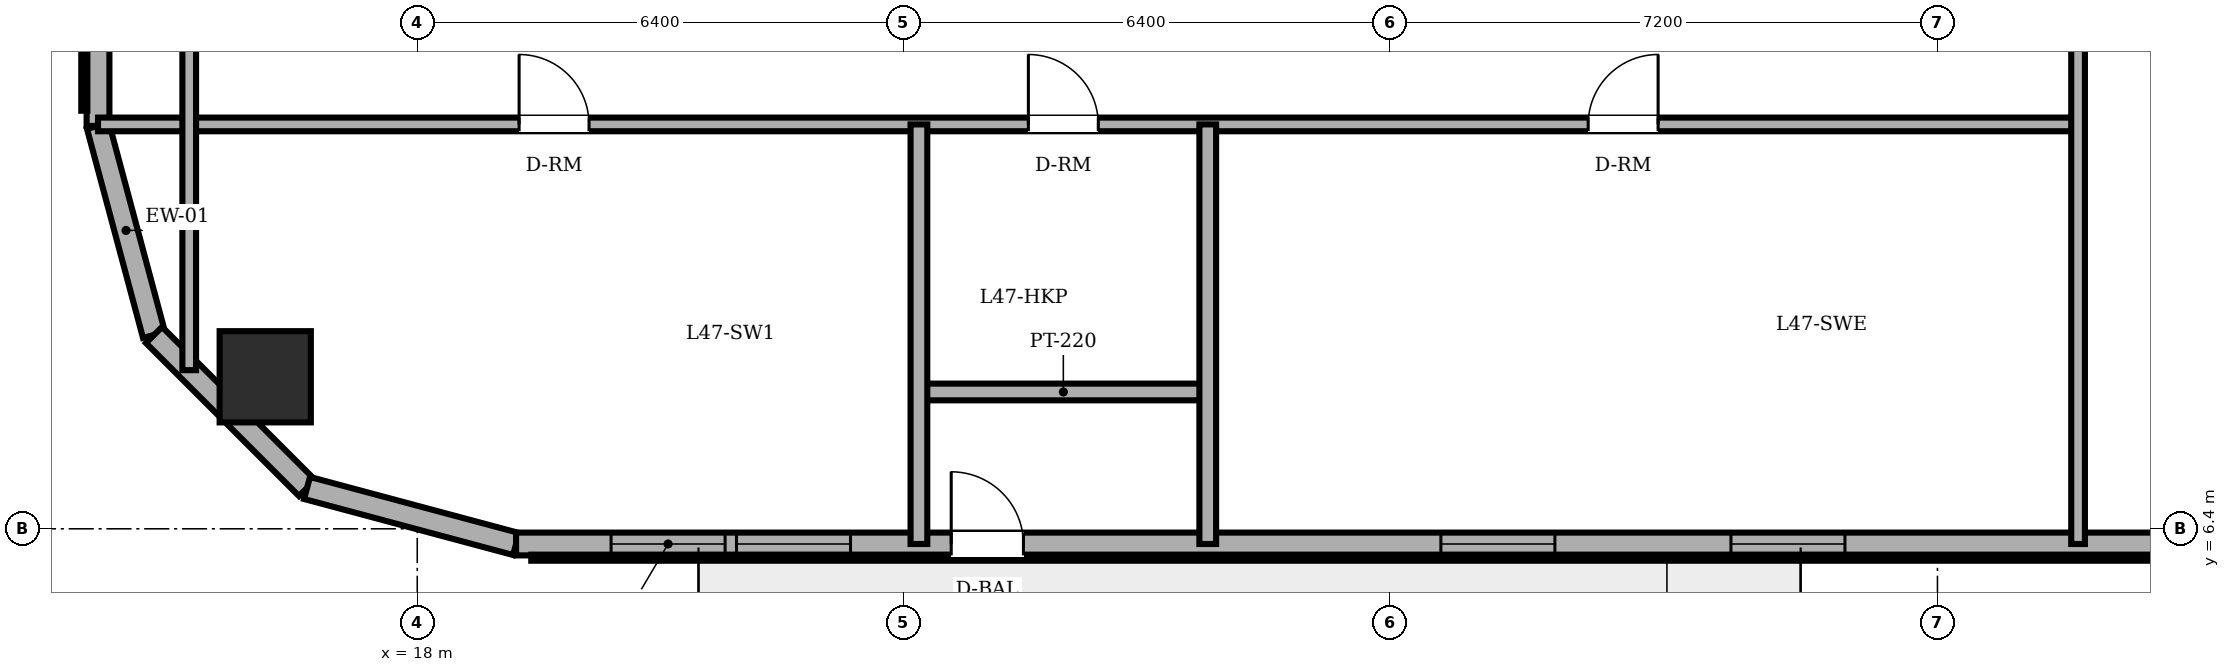
"""IFC4 building model, lengths in metres.
Left out: names, types, materials, properties, quantities, classifications, styles, units other than length and angle.
Written with IfcOpenShell. Run it as: python <this file> out.ifc"""

import sys

from ifc_helpers import new_model, si_unit, direction, frame, frame_2d, origin, origin_2d, place, context, subcontext, project, spatial, rectangle, circle, extrude, element, fill, save


model = new_model("IFC4")
c1 = context("Model", 3, precision=1e-05, world=origin(), true_north=direction((0.0, 1.0)))
c2 = subcontext(c1, "Body", "Model", "MODEL_VIEW")
j1 = project(units=[si_unit("LENGTHUNIT", "METRE"), si_unit("PLANEANGLEUNIT", "RADIAN")], contexts=[c1])
p1 = place(None, origin())
s1 = spatial("IfcSite", under=j1, at=p1, CompositionType="ELEMENT")
p2 = place(p1, origin())
s2 = spatial("IfcBuilding", under=s1, at=p2, CompositionType="ELEMENT")
p3 = place(p2, frame((0.0, 0.0, 179.8)))
s3 = spatial("IfcBuildingStorey", under=s2, at=p3, CompositionType="ELEMENT", Elevation=179.8)
p4 = place(p3, frame((16.0, 8.4, 0.0), z_axis=(0.0, 0.0, 1.0), x_axis=(1.0, 0.0, 0.0)))
e1 = element("IfcColumn", 1, at=p4, inside=s3, PredefinedType="COLUMN", context=c2, shape_type="SweptSolid", body=[
    extrude(circle(Radius=0.6, at=origin_2d()), origin(), (0.0, 0.0, 1.0), 3.6),
])
p5 = place(p3, frame((13.8, 11.7, 0.0), z_axis=(0.0, 0.0, 1.0), x_axis=(0.258884674387, -0.965908238586, 0.0)))
e2 = element("IfcWall", 2, at=p5, inside=s3, PredefinedType="SOLIDWALL", context=c2, shape_type="SweptSolid", body=[
    extrude(rectangle(XDim=2.847, YDim=0.3, at=frame_2d((1.424, 0.0))), origin(), (0.0, 0.0, 1.0), 3.4),
])
p6 = place(p3, frame((14.537, 8.95, 0.0), z_axis=(0.0, 0.0, 1.0), x_axis=(0.707106781187, -0.707106781187, 0.0)))
e3 = element("IfcWall", 3, at=p6, inside=s3, PredefinedType="SOLIDWALL", context=c2, shape_type="SweptSolid", body=[
    extrude(rectangle(XDim=2.847, YDim=0.3, at=frame_2d((1.423, 0.0))), origin(), (0.0, 0.0, 1.0), 3.4),
])
p7 = place(p3, frame((16.55, 6.937, 0.0), z_axis=(0.0, 0.0, 1.0), x_axis=(0.965908238586, -0.258884674387, 0.0)))
e4 = element("IfcWall", 4, at=p7, inside=s3, PredefinedType="SOLIDWALL", context=c2, shape_type="SweptSolid", body=[
    extrude(rectangle(XDim=2.847, YDim=0.3, at=frame_2d((1.424, 0.0))), origin(), (0.0, 0.0, 1.0), 3.4),
])
p8 = place(p3, frame((19.3, 6.2, 0.0), z_axis=(0.0, 0.0, 1.0), x_axis=(1.0, 0.0, 0.0)))
e5 = element("IfcWall", 5, at=p8, inside=s3, PredefinedType="SOLIDWALL", context=c2, shape_type="SweptSolid", body=[
    extrude(rectangle(XDim=30.282, YDim=0.3, at=frame_2d((15.141, 0.0))), origin(), (0.0, 0.0, 1.0), 3.4),
])
p9 = place(p8, frame((5.725, 0.0, 0.0)))
e6 = element("IfcOpeningElement", 6, at=p9, cuts=e5, PredefinedType="OPENING", context=c2, shape_type="SweptSolid", body=[
    extrude(rectangle(XDim=0.95, YDim=2.2, at=frame_2d((0.475, 1.1))), frame((0.0, 0.16, 0.0), z_axis=(0.0, -1.0, 0.0), x_axis=(1.0, 0.0, 0.0)), (0.0, 0.0, 1.0), 0.32),
])
p10 = place(p8, frame((1.25, 0.0, 0.85)))
e7 = element("IfcOpeningElement", 7, at=p10, cuts=e5, PredefinedType="OPENING", context=c2, shape_type="SweptSolid", body=[
    extrude(rectangle(XDim=1.5, YDim=1.55, at=frame_2d((0.75, 0.775))), frame((0.0, 0.16, 0.0), z_axis=(0.0, -1.0, 0.0), x_axis=(1.0, 0.0, 0.0)), (0.0, 0.0, 1.0), 0.32),
])
p11 = place(p8, frame((2.9, 0.0, 0.85)))
e8 = element("IfcOpeningElement", 8, at=p11, cuts=e5, PredefinedType="OPENING", context=c2, shape_type="SweptSolid", body=[
    extrude(rectangle(XDim=1.5, YDim=1.55, at=frame_2d((0.75, 0.775))), frame((0.0, 0.16, 0.0), z_axis=(0.0, -1.0, 0.0), x_axis=(1.0, 0.0, 0.0)), (0.0, 0.0, 1.0), 0.32),
])
p12 = place(p8, frame((12.167, 0.0, 0.85)))
e9 = element("IfcOpeningElement", 9, at=p12, cuts=e5, PredefinedType="OPENING", context=c2, shape_type="SweptSolid", body=[
    extrude(rectangle(XDim=1.5, YDim=1.55, at=frame_2d((0.75, 0.775))), frame((0.0, 0.16, 0.0), z_axis=(0.0, -1.0, 0.0), x_axis=(1.0, 0.0, 0.0)), (0.0, 0.0, 1.0), 0.32),
])
p13 = place(p8, frame((15.983, 0.0, 0.85)))
e10 = element("IfcOpeningElement", 10, at=p13, cuts=e5, PredefinedType="OPENING", context=c2, shape_type="SweptSolid", body=[
    extrude(rectangle(XDim=1.5, YDim=1.55, at=frame_2d((0.75, 0.775))), frame((0.0, 0.16, 0.0), z_axis=(0.0, -1.0, 0.0), x_axis=(1.0, 0.0, 0.0)), (0.0, 0.0, 1.0), 0.32),
])
p14 = place(p8, frame((21.6, 0.0, 0.85)))
e11 = element("IfcOpeningElement", 11, at=p14, cuts=e5, PredefinedType="OPENING", context=c2, shape_type="SweptSolid", body=[
    extrude(rectangle(XDim=1.5, YDim=1.55, at=frame_2d((0.75, 0.775))), frame((0.0, 0.16, 0.0), z_axis=(0.0, -1.0, 0.0), x_axis=(1.0, 0.0, 0.0)), (0.0, 0.0, 1.0), 0.32),
])
p15 = place(p8, frame((25.327, 0.0, 0.85)))
e12 = element("IfcOpeningElement", 12, at=p15, cuts=e5, PredefinedType="OPENING", context=c2, shape_type="SweptSolid", body=[
    extrude(rectangle(XDim=1.5, YDim=1.55, at=frame_2d((0.75, 0.775))), frame((0.0, 0.16, 0.0), z_axis=(0.0, -1.0, 0.0), x_axis=(1.0, 0.0, 0.0)), (0.0, 0.0, 1.0), 0.32),
])
p16 = place(p8, frame((27.255, 0.0, 0.85)))
e13 = element("IfcOpeningElement", 13, at=p16, cuts=e5, PredefinedType="OPENING", context=c2, shape_type="SweptSolid", body=[
    extrude(rectangle(XDim=1.5, YDim=1.55, at=frame_2d((0.75, 0.775))), frame((0.0, 0.16, 0.0), z_axis=(0.0, -1.0, 0.0), x_axis=(1.0, 0.0, 0.0)), (0.0, 0.0, 1.0), 0.32),
])
p17 = place(p3, frame((13.8, 36.3, 0.0), z_axis=(0.0, 0.0, 1.0), x_axis=(0.0, -1.0, 0.0)))
e14 = element("IfcWall", 14, at=p17, inside=s3, PredefinedType="SOLIDWALL", context=c2, shape_type="SweptSolid", body=[
    extrude(rectangle(XDim=24.6, YDim=0.3, at=frame_2d((12.3, 0.0))), origin(), (0.0, 0.0, 1.0), 3.4),
])
p18 = place(p17, frame((5.003, 0.0, 0.85)))
e15 = element("IfcOpeningElement", 15, at=p18, cuts=e14, PredefinedType="OPENING", context=c2, shape_type="SweptSolid", body=[
    extrude(rectangle(XDim=1.5, YDim=1.55, at=frame_2d((0.75, 0.775))), frame((0.0, 0.16, 0.0), z_axis=(0.0, -1.0, 0.0), x_axis=(1.0, 0.0, 0.0)), (0.0, 0.0, 1.0), 0.32),
])
p19 = place(p17, frame((8.277, 0.0, 0.85)))
e16 = element("IfcOpeningElement", 16, at=p19, cuts=e14, PredefinedType="OPENING", context=c2, shape_type="SweptSolid", body=[
    extrude(rectangle(XDim=1.5, YDim=1.55, at=frame_2d((0.75, 0.775))), frame((0.0, 0.16, 0.0), z_axis=(0.0, -1.0, 0.0), x_axis=(1.0, 0.0, 0.0)), (0.0, 0.0, 1.0), 0.32),
])
p20 = place(p17, frame((14.823, 0.0, 0.85)))
e17 = element("IfcOpeningElement", 17, at=p20, cuts=e14, PredefinedType="OPENING", context=c2, shape_type="SweptSolid", body=[
    extrude(rectangle(XDim=1.5, YDim=1.55, at=frame_2d((0.75, 0.775))), frame((0.0, 0.16, 0.0), z_axis=(0.0, -1.0, 0.0), x_axis=(1.0, 0.0, 0.0)), (0.0, 0.0, 1.0), 0.32),
])
p21 = place(p17, frame((18.097, 0.0, 0.85)))
e18 = element("IfcOpeningElement", 18, at=p21, cuts=e14, PredefinedType="OPENING", context=c2, shape_type="SweptSolid", body=[
    extrude(rectangle(XDim=1.5, YDim=1.55, at=frame_2d((0.75, 0.775))), frame((0.0, 0.16, 0.0), z_axis=(0.0, -1.0, 0.0), x_axis=(1.0, 0.0, 0.0)), (0.0, 0.0, 1.0), 0.32),
])
p22 = place(p3, frame((24.6, 8.2, 0.0), z_axis=(0.0, 0.0, 1.0), x_axis=(1.0, 0.0, 0.0)))
e19 = element("IfcWall", 19, at=p22, inside=s3, PredefinedType="PARTITIONING", context=c2, shape_type="SweptSolid", body=[
    extrude(rectangle(XDim=3.8, YDim=0.22, at=frame_2d((1.9, 0.0))), origin(), (0.0, 0.0, 1.0), 2.882),
])
p23 = place(p3, frame((13.8, 11.72, 0.0), z_axis=(0.0, 0.0, 1.0), x_axis=(1.0, 0.0, 0.0)))
e20 = element("IfcWall", 20, at=p23, inside=s3, PredefinedType="PARTITIONING", context=c2, shape_type="SweptSolid", body=[
    extrude(rectangle(XDim=26.05, YDim=0.18, at=frame_2d((13.025, 0.0))), origin(), (0.0, 0.0, 1.0), 3.4),
])
p24 = place(p23, frame((12.24, 0.0, 0.0)))
e21 = element("IfcOpeningElement", 21, at=p24, cuts=e20, PredefinedType="OPENING", context=c2, shape_type="SweptSolid", body=[
    extrude(rectangle(XDim=0.92, YDim=2.1, at=frame_2d((0.46, 1.05))), frame((0.0, 0.1, 0.0), z_axis=(0.0, -1.0, 0.0), x_axis=(1.0, 0.0, 0.0)), (0.0, 0.0, 1.0), 0.2),
])
p25 = place(p23, frame((5.54, 0.0, 0.0)))
e22 = element("IfcOpeningElement", 22, at=p25, cuts=e20, PredefinedType="OPENING", context=c2, shape_type="SweptSolid", body=[
    extrude(rectangle(XDim=0.92, YDim=2.1, at=frame_2d((0.46, 1.05))), frame((0.0, 0.1, 0.0), z_axis=(0.0, -1.0, 0.0), x_axis=(1.0, 0.0, 0.0)), (0.0, 0.0, 1.0), 0.2),
])
p26 = place(p23, frame((19.605, 0.0, 0.0)))
e23 = element("IfcOpeningElement", 23, at=p26, cuts=e20, PredefinedType="OPENING", context=c2, shape_type="SweptSolid", body=[
    extrude(rectangle(XDim=0.92, YDim=2.1, at=frame_2d((0.46, 1.05))), frame((0.0, 0.1, 0.0), z_axis=(0.0, -1.0, 0.0), x_axis=(1.0, 0.0, 0.0)), (0.0, 0.0, 1.0), 0.2),
])
p27 = place(p3, frame((15.0, 8.487, 0.0), z_axis=(0.0, 0.0, 1.0), x_axis=(0.0, 1.0, 0.0)))
e24 = element("IfcWall", 24, at=p27, inside=s3, PredefinedType="PARTITIONING", context=c2, shape_type="SweptSolid", body=[
    extrude(rectangle(XDim=5.693, YDim=0.18, at=frame_2d((2.846, 0.0))), origin(), (0.0, 0.0, 1.0), 3.4),
])
for number, where, z_axis, x_axis in (
    (25, (24.6, 6.2, 0.0), (0.0, 0.0, 1.0), (0.0, 1.0, 0.0)),
    (26, (28.4, 6.2, 0.0), (0.0, 0.0, 1.0), (0.0, 1.0, 0.0)),
):
    element("IfcWall", number, at=place(p3, frame(where, z_axis=z_axis, x_axis=x_axis)), inside=s3, PredefinedType="PARTITIONING", context=c2, shape_type="SweptSolid", body=[
        extrude(rectangle(XDim=5.52, YDim=0.22, at=frame_2d((2.76, 0.0))), origin(), (0.0, 0.0, 1.0), 3.4),
    ])
p28 = place(p3, frame((39.85, 6.2, 0.0), z_axis=(0.0, 0.0, 1.0), x_axis=(0.0, 1.0, 0.0)))
e27 = element("IfcWall", 27, at=p28, inside=s3, PredefinedType="PARTITIONING", context=c2, shape_type="SweptSolid", body=[
    extrude(rectangle(XDim=16.62, YDim=0.18, at=frame_2d((8.31, 0.0))), origin(), (0.0, 0.0, 1.0), 3.4),
])
p29 = place(p28, frame((10.35, 0.0, 0.0)))
e28 = element("IfcOpeningElement", 28, at=p29, cuts=e27, PredefinedType="OPENING", context=c2, shape_type="SweptSolid", body=[
    extrude(rectangle(XDim=0.92, YDim=2.1, at=frame_2d((0.46, 1.05))), frame((0.0, 0.1, 0.0), z_axis=(0.0, -1.0, 0.0), x_axis=(1.0, 0.0, 0.0)), (0.0, 0.0, 1.0), 0.2),
])
p30 = place(p9, origin())
e29 = element("IfcDoor", 29, at=p30, inside=s3, OperationType="SINGLE_SWING_LEFT", PredefinedType="DOOR", context=c2, shape_type="SweptSolid", body=[
    extrude(rectangle(XDim=0.95, YDim=2.2, at=frame_2d((0.475, 1.1))), frame((0.0, 0.025, 0.0), z_axis=(0.0, -1.0, 0.0), x_axis=(1.0, 0.0, 0.0)), (0.0, 0.0, 1.0), 0.05),
])
fill(e6, e29)
p31 = place(p10, origin())
e30 = element("IfcWindow", 30, at=p31, inside=s3, PartitioningType="DOUBLE_PANEL_VERTICAL", PredefinedType="WINDOW", context=c2, shape_type="SweptSolid", body=[
    extrude(rectangle(XDim=1.5, YDim=1.55, at=frame_2d((0.75, 0.775))), frame((0.0, 0.03, 0.0), z_axis=(0.0, -1.0, 0.0), x_axis=(1.0, 0.0, 0.0)), (0.0, 0.0, 1.0), 0.06),
])
fill(e7, e30)
p32 = place(p11, origin())
e31 = element("IfcWindow", 31, at=p32, inside=s3, PartitioningType="DOUBLE_PANEL_VERTICAL", PredefinedType="WINDOW", context=c2, shape_type="SweptSolid", body=[
    extrude(rectangle(XDim=1.5, YDim=1.55, at=frame_2d((0.75, 0.775))), frame((0.0, 0.03, 0.0), z_axis=(0.0, -1.0, 0.0), x_axis=(1.0, 0.0, 0.0)), (0.0, 0.0, 1.0), 0.06),
])
fill(e8, e31)
p33 = place(p12, origin())
e32 = element("IfcWindow", 32, at=p33, inside=s3, PartitioningType="DOUBLE_PANEL_VERTICAL", PredefinedType="WINDOW", context=c2, shape_type="SweptSolid", body=[
    extrude(rectangle(XDim=1.5, YDim=1.55, at=frame_2d((0.75, 0.775))), frame((0.0, 0.03, 0.0), z_axis=(0.0, -1.0, 0.0), x_axis=(1.0, 0.0, 0.0)), (0.0, 0.0, 1.0), 0.06),
])
fill(e9, e32)
p34 = place(p13, origin())
e33 = element("IfcWindow", 33, at=p34, inside=s3, PartitioningType="DOUBLE_PANEL_VERTICAL", PredefinedType="WINDOW", context=c2, shape_type="SweptSolid", body=[
    extrude(rectangle(XDim=1.5, YDim=1.55, at=frame_2d((0.75, 0.775))), frame((0.0, 0.03, 0.0), z_axis=(0.0, -1.0, 0.0), x_axis=(1.0, 0.0, 0.0)), (0.0, 0.0, 1.0), 0.06),
])
fill(e10, e33)
p35 = place(p24, origin())
e34 = element("IfcDoor", 34, at=p35, inside=s3, OperationType="SINGLE_SWING_LEFT", PredefinedType="DOOR", context=c2, shape_type="SweptSolid", body=[
    extrude(rectangle(XDim=0.92, YDim=2.1, at=frame_2d((0.46, 1.05))), frame((0.0, 0.025, 0.0), z_axis=(0.0, -1.0, 0.0), x_axis=(1.0, 0.0, 0.0)), (0.0, 0.0, 1.0), 0.05),
])
fill(e21, e34)
p36 = place(p25, origin())
e35 = element("IfcDoor", 35, at=p36, inside=s3, OperationType="SINGLE_SWING_LEFT", PredefinedType="DOOR", context=c2, shape_type="SweptSolid", body=[
    extrude(rectangle(XDim=0.92, YDim=2.1, at=frame_2d((0.46, 1.05))), frame((0.0, 0.025, 0.0), z_axis=(0.0, -1.0, 0.0), x_axis=(1.0, 0.0, 0.0)), (0.0, 0.0, 1.0), 0.05),
])
fill(e22, e35)
p37 = place(p26, origin())
e36 = element("IfcDoor", 36, at=p37, inside=s3, OperationType="SINGLE_SWING_RIGHT", PredefinedType="DOOR", context=c2, shape_type="SweptSolid", body=[
    extrude(rectangle(XDim=0.92, YDim=2.1, at=frame_2d((0.46, 1.05))), frame((0.0, 0.025, 0.0), z_axis=(0.0, -1.0, 0.0), x_axis=(1.0, 0.0, 0.0)), (0.0, 0.0, 1.0), 0.05),
])
fill(e23, e36)
save(model, sys.argv[1])
